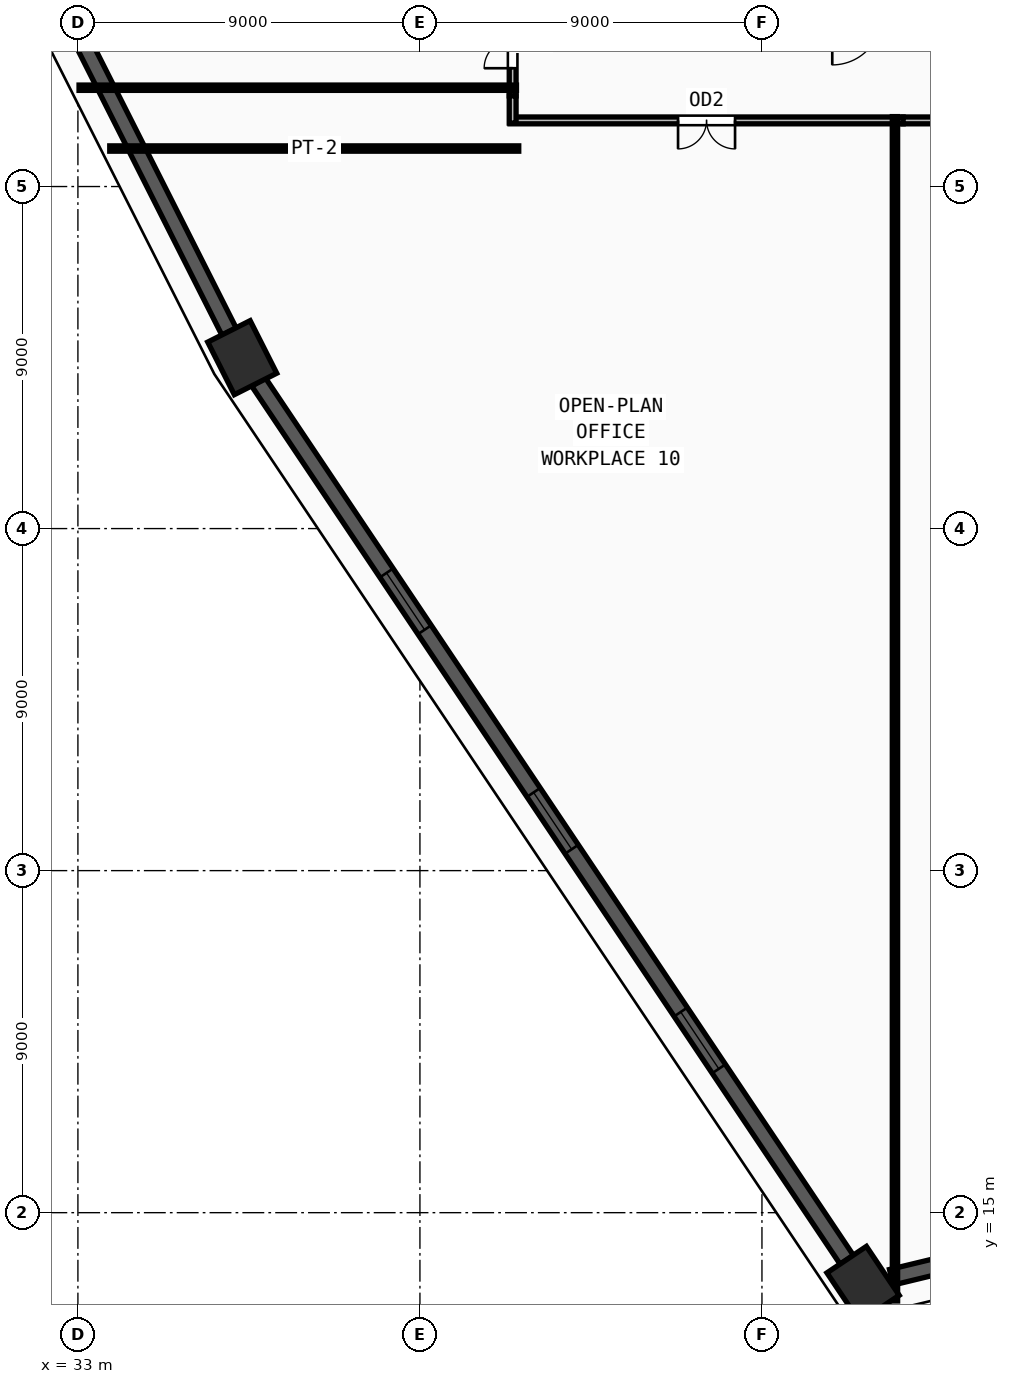
"""IFC4 building model, lengths in metres.
Left out: names, types, materials, properties, quantities, classifications, styles, units other than length and angle.
Written with IfcOpenShell. Run it as: python <this file> out.ifc"""

import sys

from ifc_helpers import new_model, si_unit, direction, frame, frame_2d, origin, origin_2d, place, context, subcontext, project, spatial, rectangle, extrude, source, transform, mapped, element, fill, save


model = new_model("IFC4")
c1 = context("Model", 3, precision=1e-05, world=origin(), true_north=direction((0.0, 1.0)))
c2 = subcontext(c1, "Body", "Model", "MODEL_VIEW")
j1 = project(units=[si_unit("LENGTHUNIT", "METRE"), si_unit("PLANEANGLEUNIT", "RADIAN")], contexts=[c1])
p1 = place(None, origin())
s1 = spatial("IfcSite", under=j1, at=p1, CompositionType="ELEMENT")
p2 = place(p1, origin())
s2 = spatial("IfcBuilding", under=s1, at=p2, CompositionType="ELEMENT")
p3 = place(p2, frame((0.0, 0.0, 51.75)))
s3 = spatial("IfcBuildingStorey", under=s2, at=p3, CompositionType="ELEMENT", Elevation=51.75)
m1 = source(origin(), c2, "Body", "SweptSolid", [
    extrude(rectangle(XDim=1.55, YDim=1.25, at=origin_2d()), origin(), (0.0, 0.0, 1.0), 3.75),
])
for number, where, z_axis, x_axis in (
    (1, (53.661, 13.121, 0.0), (0.0, 0.0, 1.0), (-0.557, 0.831, 0.0)),
    (2, (37.324, 37.497, 0.0), (0.0, 0.0, 1.0), (-0.451, 0.893, 0.0)),
):
    element("IfcColumn", number, at=place(p3, frame(where, z_axis=z_axis, x_axis=x_axis)), inside=s3, PredefinedType="COLUMN", context=c2, shape_type="MappedRepresentation", body=[
        mapped(m1, transform((0.0, 0.0, 0.0), x_axis=(1.0, 0.0, 0.0), y_axis=(0.0, 1.0, 0.0), z_axis=(0.0, 0.0, 1.0), scale=1.0)),
    ])
p4 = place(p3, frame((21.778, 68.272, 0.0), z_axis=(0.0, 0.0, 1.0), x_axis=(0.45088567069, -0.892581711647, 0.0)))
e3 = element("IfcWall", 3, at=p4, inside=s3, PredefinedType="SOLIDWALL", context=c2, shape_type="SweptSolid", body=[
    extrude(rectangle(XDim=33.713, YDim=0.42, at=frame_2d((16.857, 0.0))), origin(), (0.0, 0.0, 1.0), 3.57),
])
m2 = source(origin(), c2, "Body", "SweptSolid", [
    extrude(rectangle(XDim=1.8, YDim=1.95, at=frame_2d((0.9, 0.975))), frame((0.0, 0.22, 0.0), z_axis=(0.0, -1.0, 0.0), x_axis=(1.0, 0.0, 0.0)), (0.0, 0.0, 1.0), 0.44),
])
p5 = place(p4, frame((7.528, 0.0, 0.55)))
e4 = element("IfcOpeningElement", 4, at=p5, cuts=e3, PredefinedType="OPENING", context=c2, shape_type="MappedRepresentation", body=[
    mapped(m2, transform((0.0, 0.0, 0.0), x_axis=(1.0, 0.0, 0.0), y_axis=(0.0, 1.0, 0.0), z_axis=(0.0, 0.0, 1.0), scale=1.0)),
])
p6 = place(p4, frame((15.957, 0.0, 0.55)))
e5 = element("IfcOpeningElement", 5, at=p6, cuts=e3, PredefinedType="OPENING", context=c2, shape_type="MappedRepresentation", body=[
    mapped(m2, transform((0.0, 0.0, 0.0), x_axis=(1.0, 0.0, 0.0), y_axis=(0.0, 1.0, 0.0), z_axis=(0.0, 0.0, 1.0), scale=1.0)),
])
p7 = place(p4, frame((23.535, 0.0, 0.55)))
e6 = element("IfcOpeningElement", 6, at=p7, cuts=e3, PredefinedType="OPENING", context=c2, shape_type="MappedRepresentation", body=[
    mapped(m2, transform((0.0, 0.0, 0.0), x_axis=(1.0, 0.0, 0.0), y_axis=(0.0, 1.0, 0.0), z_axis=(0.0, 0.0, 1.0), scale=1.0)),
])
p8 = place(p3, frame((37.75, 36.862, 0.0), z_axis=(0.0, 0.0, 1.0), x_axis=(0.556718017368, -0.830701540349, 0.0)))
e7 = element("IfcWall", 7, at=p8, inside=s3, PredefinedType="SOLIDWALL", context=c2, shape_type="SweptSolid", body=[
    extrude(rectangle(XDim=27.815, YDim=0.42, at=frame_2d((13.907, 0.0))), origin(), (0.0, 0.0, 1.0), 3.57),
])
p9 = place(p8, frame((6.054, 0.0, 0.55)))
e8 = element("IfcOpeningElement", 8, at=p9, cuts=e7, PredefinedType="OPENING", context=c2, shape_type="MappedRepresentation", body=[
    mapped(m2, transform((0.0, 0.0, 0.0), x_axis=(1.0, 0.0, 0.0), y_axis=(0.0, 1.0, 0.0), z_axis=(0.0, 0.0, 1.0), scale=1.0)),
])
p10 = place(p8, frame((13.007, 0.0, 0.55)))
e9 = element("IfcOpeningElement", 9, at=p10, cuts=e7, PredefinedType="OPENING", context=c2, shape_type="MappedRepresentation", body=[
    mapped(m2, transform((0.0, 0.0, 0.0), x_axis=(1.0, 0.0, 0.0), y_axis=(0.0, 1.0, 0.0), z_axis=(0.0, 0.0, 1.0), scale=1.0)),
])
p11 = place(p8, frame((19.961, 0.0, 0.55)))
e10 = element("IfcOpeningElement", 10, at=p11, cuts=e7, PredefinedType="OPENING", context=c2, shape_type="MappedRepresentation", body=[
    mapped(m2, transform((0.0, 0.0, 0.0), x_axis=(1.0, 0.0, 0.0), y_axis=(0.0, 1.0, 0.0), z_axis=(0.0, 0.0, 1.0), scale=1.0)),
])
p12 = place(p3, frame((54.405, 13.301, 0.0), z_axis=(0.0, 0.0, 1.0), x_axis=(0.972084517215, 0.234630968524, 0.0)))
e11 = element("IfcWall", 11, at=p12, inside=s3, PredefinedType="SOLIDWALL", context=c2, shape_type="SweptSolid", body=[
    extrude(rectangle(XDim=4.99, YDim=0.42, at=frame_2d((2.495, 0.0))), origin(), (0.0, 0.0, 1.0), 3.57),
])
m3 = source(origin(), c2, "Body", "SweptSolid", [
    extrude(rectangle(XDim=1.2, YDim=1.9, at=frame_2d((0.6, 0.95))), frame((0.0, 0.22, 0.0), z_axis=(0.0, -1.0, 0.0), x_axis=(1.0, 0.0, 0.0)), (0.0, 0.0, 1.0), 0.44),
])
p13 = place(p12, frame((1.895, 0.0, 0.55)))
e12 = element("IfcOpeningElement", 12, at=p13, cuts=e11, PredefinedType="OPENING", context=c2, shape_type="MappedRepresentation", body=[
    mapped(m3, transform((0.0, 0.0, 0.0), x_axis=(1.0, 0.0, 0.0), y_axis=(0.0, 1.0, 0.0), z_axis=(0.0, 0.0, 1.0), scale=1.0)),
])
p14 = place(p3, frame((44.44, 44.385, 0.0), z_axis=(0.0, 0.0, 1.0), x_axis=(0.0, 1.0, 0.0)))
e13 = element("IfcWall", 13, at=p14, inside=s3, PredefinedType="PARTITIONING", context=c2, shape_type="SweptSolid", body=[
    extrude(rectangle(XDim=2.955, YDim=0.18, at=frame_2d((1.478, 0.0))), origin(), (0.0, 0.0, 1.0), 3.57),
])
m4 = source(origin(), c2, "Body", "SweptSolid", [
    extrude(rectangle(XDim=1.5, YDim=2.2, at=frame_2d((0.75, 1.1))), frame((0.0, 0.1, 0.0), z_axis=(0.0, -1.0, 0.0), x_axis=(1.0, 0.0, 0.0)), (0.0, 0.0, 1.0), 0.2),
])
p15 = place(p14, frame((0.728, 0.0, 0.0)))
e14 = element("IfcOpeningElement", 14, at=p15, cuts=e13, PredefinedType="OPENING", context=c2, shape_type="MappedRepresentation", body=[
    mapped(m4, transform((0.0, 0.0, 0.0), x_axis=(1.0, 0.0, 0.0), y_axis=(0.0, 1.0, 0.0), z_axis=(0.0, 0.0, 1.0), scale=1.0)),
])
p16 = place(p3, frame((54.715, 43.74, 0.0), z_axis=(0.0, 0.0, 1.0), x_axis=(-1.0, 0.0, 0.0)))
e15 = element("IfcWall", 15, at=p16, inside=s3, PredefinedType="PARTITIONING", context=c2, shape_type="SweptSolid", body=[
    extrude(rectangle(XDim=10.345, YDim=0.18, at=frame_2d((5.172, 0.0))), origin(), (0.0, 0.0, 1.0), 3.57),
])
p17 = place(p16, frame((4.423, 0.0, 0.0)))
e16 = element("IfcOpeningElement", 16, at=p17, cuts=e15, PredefinedType="OPENING", context=c2, shape_type="MappedRepresentation", body=[
    mapped(m4, transform((0.0, 0.0, 0.0), x_axis=(1.0, 0.0, 0.0), y_axis=(0.0, 1.0, 0.0), z_axis=(0.0, 0.0, 1.0), scale=1.0)),
])
p18 = place(p3, frame((65.715, 43.74, 0.0), z_axis=(0.0, 0.0, 1.0), x_axis=(-1.0, 0.0, 0.0)))
e17 = element("IfcWall", 17, at=p18, inside=s3, PredefinedType="PARTITIONING", context=c2, shape_type="SweptSolid", body=[
    extrude(rectangle(XDim=11.0, YDim=0.18, at=frame_2d((5.5, 0.0))), origin(), (0.0, 0.0, 1.0), 3.57),
])
m5 = source(origin(), c2, "Body", "SweptSolid", [
    extrude(rectangle(XDim=0.85, YDim=2.1, at=frame_2d((0.425, 1.05))), frame((0.0, 0.1, 0.0), z_axis=(0.0, -1.0, 0.0), x_axis=(1.0, 0.0, 0.0)), (0.0, 0.0, 1.0), 0.2),
])
p19 = place(p18, frame((0.575, 0.0, 0.0)))
e18 = element("IfcOpeningElement", 18, at=p19, cuts=e17, PredefinedType="OPENING", context=c2, shape_type="MappedRepresentation", body=[
    mapped(m5, transform((0.0, 0.0, 0.0), x_axis=(1.0, 0.0, 0.0), y_axis=(0.0, 1.0, 0.0), z_axis=(0.0, 0.0, 1.0), scale=1.0)),
])
p20 = place(p3, frame((44.44, 43.67, 0.0), z_axis=(0.0, 0.0, 1.0), x_axis=(0.0, 1.0, 0.0)))
e19 = element("IfcWall", 19, at=p20, inside=s3, PredefinedType="PARTITIONING", context=c2, shape_type="SweptSolid", body=[
    extrude(rectangle(XDim=0.715, YDim=0.18, at=frame_2d((0.357, 0.0))), origin(), (0.0, 0.0, 1.0), 3.57),
])
p21 = place(p3, frame((44.6, 43.0, 0.0), z_axis=(0.0, 0.0, 1.0), x_axis=(-1.0, 0.0, 0.0)))
e20 = element("IfcWall", 20, at=p21, inside=s3, PredefinedType="PARTITIONING", context=c2, shape_type="SweptSolid", body=[
    extrude(rectangle(XDim=10.762, YDim=0.14, at=frame_2d((5.381, 0.0))), origin(), (0.0, 0.0, 1.0), 3.57),
])
p22 = place(p3, frame((44.54, 44.6, 0.0), z_axis=(0.0, 0.0, 1.0), x_axis=(-1.0, 0.0, 0.0)))
e21 = element("IfcWall", 21, at=p22, inside=s3, PredefinedType="PARTITIONING", context=c2, shape_type="SweptSolid", body=[
    extrude(rectangle(XDim=11.51, YDim=0.14, at=frame_2d((5.755, 0.0))), origin(), (0.0, 0.0, 1.0), 3.57),
])
p23 = place(p3, frame((54.5, 43.84, 0.0), z_axis=(0.0, 0.0, 1.0), x_axis=(0.0, -1.0, 0.0)))
e22 = element("IfcWall", 22, at=p23, inside=s3, PredefinedType="PARTITIONING", context=c2, shape_type="SweptSolid", body=[
    extrude(rectangle(XDim=31.164, YDim=0.14, at=frame_2d((15.582, 0.0))), origin(), (0.0, 0.0, 1.0), 3.57),
])
m6 = source(origin(), c2, "Body", "SweptSolid", [
    extrude(rectangle(XDim=1.8, YDim=1.95, at=frame_2d((0.9, 0.975))), frame((0.0, 0.03, 0.0), z_axis=(0.0, -1.0, 0.0), x_axis=(1.0, 0.0, 0.0)), (0.0, 0.0, 1.0), 0.06),
])
p24 = place(p9, origin())
e23 = element("IfcWindow", 23, at=p24, inside=s3, PartitioningType="DOUBLE_PANEL_VERTICAL", PredefinedType="WINDOW", context=c2, shape_type="MappedRepresentation", body=[
    mapped(m6, transform((0.0, 0.0, 0.0), x_axis=(1.0, 0.0, 0.0), y_axis=(0.0, 1.0, 0.0), z_axis=(0.0, 0.0, 1.0), scale=1.0)),
])
fill(e8, e23)
p25 = place(p10, origin())
e24 = element("IfcWindow", 24, at=p25, inside=s3, PartitioningType="DOUBLE_PANEL_VERTICAL", PredefinedType="WINDOW", context=c2, shape_type="MappedRepresentation", body=[
    mapped(m6, transform((0.0, 0.0, 0.0), x_axis=(1.0, 0.0, 0.0), y_axis=(0.0, 1.0, 0.0), z_axis=(0.0, 0.0, 1.0), scale=1.0)),
])
fill(e9, e24)
p26 = place(p11, origin())
e25 = element("IfcWindow", 25, at=p26, inside=s3, PartitioningType="DOUBLE_PANEL_VERTICAL", PredefinedType="WINDOW", context=c2, shape_type="MappedRepresentation", body=[
    mapped(m6, transform((0.0, 0.0, 0.0), x_axis=(1.0, 0.0, 0.0), y_axis=(0.0, 1.0, 0.0), z_axis=(0.0, 0.0, 1.0), scale=1.0)),
])
fill(e10, e25)
m7 = source(origin(), c2, "Body", "SweptSolid", [
    extrude(rectangle(XDim=1.5, YDim=2.2, at=frame_2d((0.75, 1.1))), frame((0.0, 0.025, 0.0), z_axis=(0.0, -1.0, 0.0), x_axis=(1.0, 0.0, 0.0)), (0.0, 0.0, 1.0), 0.05),
])
p27 = place(p15, origin())
e26 = element("IfcDoor", 26, at=p27, inside=s3, OperationType="DOUBLE_DOOR_SINGLE_SWING", PredefinedType="DOOR", context=c2, shape_type="MappedRepresentation", body=[
    mapped(m7, transform((0.0, 0.0, 0.0), x_axis=(1.0, 0.0, 0.0), y_axis=(0.0, 1.0, 0.0), z_axis=(0.0, 0.0, 1.0), scale=1.0)),
])
fill(e14, e26)
p28 = place(p17, origin())
e27 = element("IfcDoor", 27, at=p28, inside=s3, OperationType="DOUBLE_DOOR_SINGLE_SWING", PredefinedType="DOOR", context=c2, shape_type="MappedRepresentation", body=[
    mapped(m7, transform((0.0, 0.0, 0.0), x_axis=(1.0, 0.0, 0.0), y_axis=(0.0, 1.0, 0.0), z_axis=(0.0, 0.0, 1.0), scale=1.0)),
])
fill(e16, e27)
save(model, sys.argv[1])
